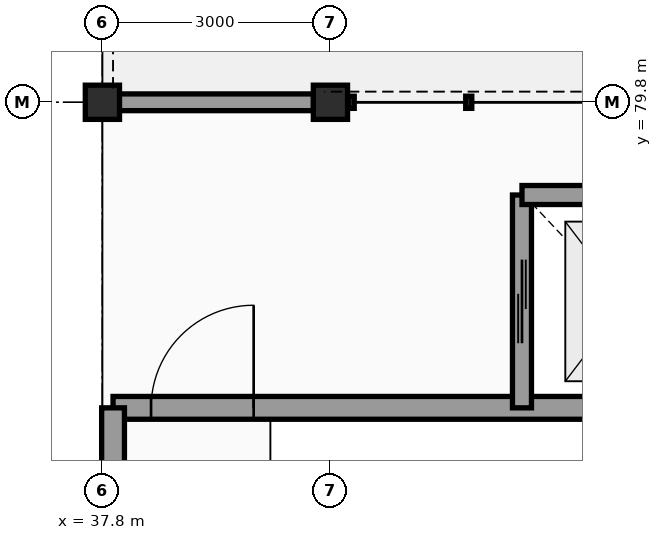
"""IFC4 building model, lengths in metres.
Left out: names, types, materials, properties, quantities, classifications, styles, units other than length and angle.
Written with IfcOpenShell. Run it as: python <this file> out.ifc"""

import sys

from ifc_helpers import new_model, si_unit, direction, frame, frame_2d, origin, origin_2d, place, context, subcontext, project, spatial, rectangle, extrude, element, fill, save


model = new_model("IFC4")
c1 = context("Model", 3, precision=1e-05, world=origin(), true_north=direction((0.0, 1.0)))
c2 = subcontext(c1, "Body", "Model", "MODEL_VIEW")
j1 = project(units=[si_unit("LENGTHUNIT", "METRE"), si_unit("PLANEANGLEUNIT", "RADIAN")], contexts=[c1])
p1 = place(None, origin())
s1 = spatial("IfcSite", under=j1, at=p1, CompositionType="ELEMENT")
p2 = place(p1, origin())
s2 = spatial("IfcBuilding", under=s1, at=p2, CompositionType="ELEMENT")
p3 = place(p2, frame((0.0, 0.0, 18.6)))
s3 = spatial("IfcBuildingStorey", under=s2, at=p3, CompositionType="ELEMENT", Elevation=18.6)
for number, where, z_axis, x_axis in (
    (1, (37.8, 79.8, 0.0), (0.0, 0.0, 1.0), (1.0, 0.0, 0.0)),
    (2, (40.8, 79.8, 0.0), (0.0, 0.0, 1.0), (1.0, 0.0, 0.0)),
):
    element("IfcColumn", number, at=place(p3, frame(where, z_axis=z_axis, x_axis=x_axis)), inside=s3, PredefinedType="COLUMN", context=c2, shape_type="SweptSolid", body=[
        extrude(rectangle(XDim=0.45, YDim=0.45, at=origin_2d()), origin(), (0.0, 0.0, 1.0), 3.35),
    ])
p4 = place(p3, frame((38.023, 79.8, 0.0), z_axis=(0.0, 0.0, 1.0), x_axis=(1.0, 0.0, 0.0)))
e3 = element("IfcWall", 3, at=p4, inside=s3, PredefinedType="SOLIDWALL", context=c2, shape_type="SweptSolid", body=[
    extrude(rectangle(XDim=2.554, YDim=0.22, at=frame_2d((1.277, 0.0))), origin(), (0.0, 0.0, 1.0), 2.65),
])
p5 = place(p3, frame((46.06, 75.78, 0.0), z_axis=(0.0, 0.0, 1.0), x_axis=(-1.0, 0.0, 0.0)))
e4 = element("IfcWall", 4, at=p5, inside=s3, PredefinedType="SHEAR", context=c2, shape_type="SweptSolid", body=[
    extrude(rectangle(XDim=8.12, YDim=0.3, at=frame_2d((4.06, 0.0))), origin(), (0.0, 0.0, 1.0), 3.35),
])
p6 = place(p5, frame((6.27, 0.0, 0.0)))
e5 = element("IfcOpeningElement", 5, at=p6, cuts=e4, PredefinedType="OPENING", context=c2, shape_type="SweptSolid", body=[
    extrude(rectangle(XDim=1.35, YDim=2.15, at=frame_2d((0.675, 1.075))), frame((0.0, 0.16, 0.0), z_axis=(0.0, -1.0, 0.0), x_axis=(1.0, 0.0, 0.0)), (0.0, 0.0, 1.0), 0.32),
])
p7 = place(p3, frame((37.94, 75.78, 0.0), z_axis=(0.0, 0.0, 1.0), x_axis=(0.0, -1.0, 0.0)))
e6 = element("IfcWall", 6, at=p7, inside=s3, PredefinedType="SHEAR", context=c2, shape_type="SweptSolid", body=[
    extrude(rectangle(XDim=4.24, YDim=0.3, at=frame_2d((2.12, 0.0))), origin(), (0.0, 0.0, 1.0), 3.35),
])
p8 = place(p3, frame((43.32, 78.58, 0.0), z_axis=(0.0, 0.0, 1.0), x_axis=(0.0, -1.0, 0.0)))
e7 = element("IfcWall", 7, at=p8, inside=s3, PredefinedType="SHEAR", context=c2, shape_type="SweptSolid", body=[
    extrude(rectangle(XDim=2.8, YDim=0.25, at=frame_2d((1.4, 0.0))), origin(), (0.0, 0.0, 1.0), 3.35),
])
p9 = place(p8, frame((0.85, 0.0, 0.0)))
e8 = element("IfcOpeningElement", 8, at=p9, cuts=e7, PredefinedType="OPENING", context=c2, shape_type="SweptSolid", body=[
    extrude(rectangle(XDim=1.1, YDim=2.15, at=frame_2d((0.55, 1.075))), frame((0.0, 0.135, 0.0), z_axis=(0.0, -1.0, 0.0), x_axis=(1.0, 0.0, 0.0)), (0.0, 0.0, 1.0), 0.27),
])
p10 = place(p3, frame((46.06, 78.58, 0.0), z_axis=(0.0, 0.0, 1.0), x_axis=(-1.0, 0.0, 0.0)))
e9 = element("IfcWall", 9, at=p10, inside=s3, PredefinedType="SHEAR", context=c2, shape_type="SweptSolid", body=[
    extrude(rectangle(XDim=2.74, YDim=0.25, at=frame_2d((1.37, 0.0))), origin(), (0.0, 0.0, 1.0), 3.35),
])
p11 = place(p6, frame((1.35, 0.0, 0.0), z_axis=(0.0, 0.0, 1.0), x_axis=(-1.0, 0.0, 0.0)))
e10 = element("IfcDoor", 10, at=p11, inside=s3, OperationType="SINGLE_SWING_LEFT", PredefinedType="DOOR", context=c2, shape_type="SweptSolid", body=[
    extrude(rectangle(XDim=1.35, YDim=2.15, at=frame_2d((0.675, 1.075))), frame((0.0, 0.025, 0.0), z_axis=(0.0, -1.0, 0.0), x_axis=(1.0, 0.0, 0.0)), (0.0, 0.0, 1.0), 0.05),
])
fill(e5, e10)
p12 = place(p9, origin())
e11 = element("IfcDoor", 11, at=p12, inside=s3, OperationType="DOUBLE_DOOR_SLIDING", PredefinedType="DOOR", context=c2, shape_type="SweptSolid", body=[
    extrude(rectangle(XDim=1.1, YDim=2.15, at=frame_2d((0.55, 1.075))), frame((0.0, 0.025, 0.0), z_axis=(0.0, -1.0, 0.0), x_axis=(1.0, 0.0, 0.0)), (0.0, 0.0, 1.0), 0.05),
])
fill(e8, e11)
save(model, sys.argv[1])
